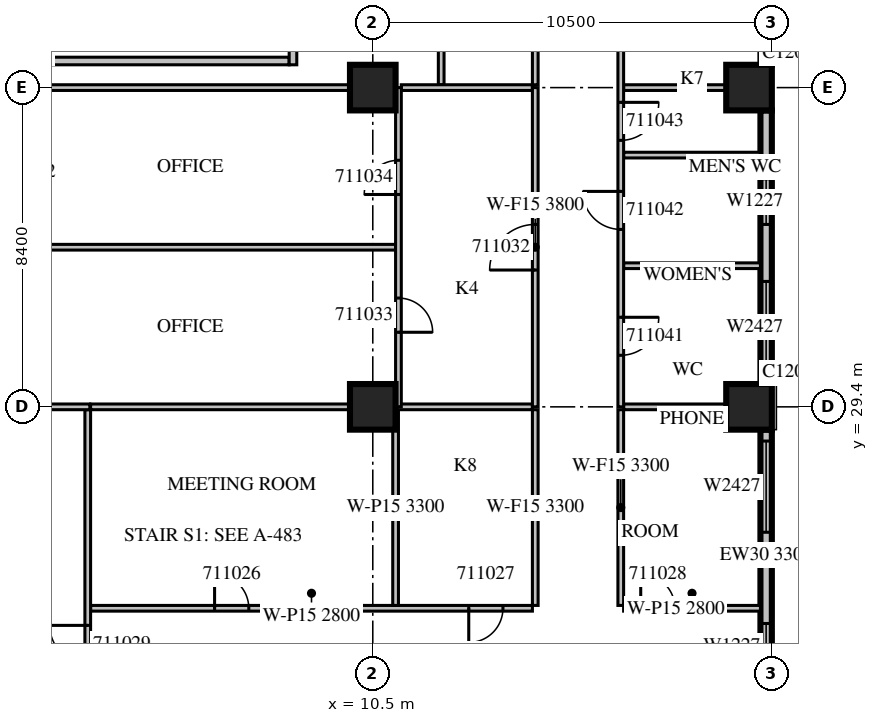
"""IFC4 building model, lengths in metres.
Left out: names, types, materials, properties, quantities, classifications, styles, units other than length and angle.
Written with IfcOpenShell. Run it as: python <this file> out.ifc"""

import sys

from ifc_helpers import new_model, si_unit, direction, frame, frame_2d, origin, origin_2d, place, context, subcontext, project, spatial, rectangle, extrude, source, transform, mapped, element, fill, save


model = new_model("IFC4")
c1 = context("Model", 3, precision=1e-05, world=origin(), true_north=direction((0.0, 1.0)))
c2 = subcontext(c1, "Body", "Model", "MODEL_VIEW")
j1 = project(units=[si_unit("LENGTHUNIT", "METRE"), si_unit("PLANEANGLEUNIT", "RADIAN")], contexts=[c1])
p1 = place(None, origin())
s1 = spatial("IfcSite", under=j1, at=p1, CompositionType="ELEMENT")
p2 = place(p1, origin())
s2 = spatial("IfcBuilding", under=s1, at=p2, CompositionType="ELEMENT")
p3 = place(p2, frame((0.0, 0.0, 57.3)))
s3 = spatial("IfcBuildingStorey", under=s2, at=p3, CompositionType="ELEMENT", Elevation=57.3)
m1 = source(origin(), c2, "Body", "SweptSolid", [
    extrude(rectangle(XDim=1.2, YDim=1.2, at=origin_2d()), origin(), (0.0, 0.0, 1.0), 4.2),
])
for number, where, z_axis, x_axis in (
    (1, (10.5, 29.4, 0.0), (0.0, 0.0, 1.0), (1.0, 0.0, 0.0)),
    (2, (20.4, 29.4, 0.0), (0.0, 0.0, 1.0), (1.0, 0.0, 0.0)),
    (3, (10.5, 37.8, 0.0), (0.0, 0.0, 1.0), (1.0, 0.0, 0.0)),
    (4, (20.4, 37.8, 0.0), (0.0, 0.0, 1.0), (1.0, 0.0, 0.0)),
):
    element("IfcColumn", number, at=place(p3, frame(where, z_axis=z_axis, x_axis=x_axis)), inside=s3, PredefinedType="COLUMN", context=c2, shape_type="MappedRepresentation", body=[
        mapped(m1, transform((0.0, 0.0, 0.0), scale=1.0)),
    ])
p4 = place(p3, frame((20.85, 22.2, 0.0), z_axis=(0.0, 0.0, 1.0), x_axis=(0.0, 1.0, 0.0)))
e5 = element("IfcWall", 5, at=p4, inside=s3, PredefinedType="STANDARD", context=c2, shape_type="SweptSolid", body=[
    extrude(rectangle(XDim=6.6, YDim=0.3, at=frame_2d((3.3, 0.0))), origin(), (0.0, 0.0, 1.0), 3.3),
])
m2 = source(origin(), c2, "Body", "SweptSolid", [
    extrude(rectangle(XDim=1.2, YDim=2.7, at=frame_2d((0.6, 1.35))), frame((0.0, 0.16, 0.0), z_axis=(0.0, -1.0, 0.0), x_axis=(1.0, 0.0, 0.0)), (0.0, 0.0, 1.0), 0.32),
])
p5 = place(p4, frame((0.3, 0.0, 0.6)))
e6 = element("IfcOpeningElement", 6, at=p5, cuts=e5, PredefinedType="OPENING", context=c2, shape_type="MappedRepresentation", body=[
    mapped(m2, transform((0.0, 0.0, 0.0), scale=1.0)),
])
m3 = source(origin(), c2, "Body", "SweptSolid", [
    extrude(rectangle(XDim=2.4, YDim=2.7, at=frame_2d((1.2, 1.35))), frame((0.0, 0.16, 0.0), z_axis=(0.0, -1.0, 0.0), x_axis=(1.0, 0.0, 0.0)), (0.0, 0.0, 1.0), 0.32),
])
p6 = place(p4, frame((3.9, 0.0, 0.6)))
e7 = element("IfcOpeningElement", 7, at=p6, cuts=e5, PredefinedType="OPENING", context=c2, shape_type="MappedRepresentation", body=[
    mapped(m3, transform((0.0, 0.0, 0.0), scale=1.0)),
])
m4 = source(origin(), c2, "Body", "SweptSolid", [
    extrude(rectangle(XDim=7.2, YDim=0.3, at=frame_2d((3.6, 0.0))), origin(), (0.0, 0.0, 1.0), 3.8),
])
p7 = place(p3, frame((20.85, 30.0, 0.0), z_axis=(0.0, 0.0, 1.0), x_axis=(0.0, 1.0, 0.0)))
e8 = element("IfcWall", 8, at=p7, inside=s3, PredefinedType="STANDARD", context=c2, shape_type="MappedRepresentation", body=[
    mapped(m4, transform((0.0, 0.0, 0.0), scale=1.0)),
])
p8 = place(p7, frame((0.3, 0.0, 0.6)))
e9 = element("IfcOpeningElement", 9, at=p8, cuts=e8, PredefinedType="OPENING", context=c2, shape_type="MappedRepresentation", body=[
    mapped(m3, transform((0.0, 0.0, 0.0), scale=1.0)),
])
p9 = place(p7, frame((4.199, 0.0, 0.6)))
e10 = element("IfcOpeningElement", 10, at=p9, cuts=e8, PredefinedType="OPENING", context=c2, shape_type="MappedRepresentation", body=[
    mapped(m2, transform((0.0, 0.0, 0.0), scale=1.0)),
])
p10 = place(p3, frame((20.85, 38.4, 0.0), z_axis=(0.0, 0.0, 1.0), x_axis=(0.0, 1.0, 0.0)))
e11 = element("IfcWall", 11, at=p10, inside=s3, PredefinedType="STANDARD", context=c2, shape_type="MappedRepresentation", body=[
    mapped(m4, transform((0.0, 0.0, 0.0), scale=1.0)),
])
p11 = place(p10, frame((0.3, 0.0, 0.6)))
e12 = element("IfcOpeningElement", 12, at=p11, cuts=e11, PredefinedType="OPENING", context=c2, shape_type="MappedRepresentation", body=[
    mapped(m3, transform((0.0, 0.0, 0.0), scale=1.0)),
])
p12 = place(p10, frame((4.5, 0.0, 0.6)))
e13 = element("IfcOpeningElement", 13, at=p12, cuts=e11, PredefinedType="OPENING", context=c2, shape_type="MappedRepresentation", body=[
    mapped(m3, transform((0.0, 0.0, 0.0), scale=1.0)),
])
m5 = source(origin(), c2, "Body", "SweptSolid", [
    extrude(rectangle(XDim=8.0, YDim=0.2, at=frame_2d((4.0, 0.0))), origin(), (0.0, 0.0, 1.0), 3.8),
])
p13 = place(p3, frame((0.3, 38.5, 0.0), z_axis=(0.0, 0.0, 1.0), x_axis=(1.0, 0.0, 0.0)))
e14 = element("IfcWall", 14, at=p13, inside=s3, PredefinedType="PARTITIONING", context=c2, shape_type="MappedRepresentation", body=[
    mapped(m5, transform((0.0, 0.0, 0.0), scale=1.0)),
])
m6 = source(origin(), c2, "Body", "SweptSolid", [
    extrude(rectangle(XDim=5.45, YDim=0.2, at=frame_2d((2.725, 0.0))), origin(), (0.0, 0.0, 1.0), 3.8),
])
p14 = place(p3, frame((8.4, 38.4, 0.0), z_axis=(0.0, 0.0, 1.0), x_axis=(0.0, 1.0, 0.0)))
e15 = element("IfcWall", 15, at=p14, inside=s3, PredefinedType="PARTITIONING", context=c2, shape_type="MappedRepresentation", body=[
    mapped(m6, transform((0.0, 0.0, 0.0), scale=1.0)),
])
m7 = source(origin(), c2, "Body", "SweptSolid", [
    extrude(rectangle(XDim=1.2, YDim=2.1, at=frame_2d((0.6, 1.05))), frame((0.0, 0.11, 0.0), z_axis=(0.0, -1.0, 0.0), x_axis=(1.0, 0.0, 0.0)), (0.0, 0.0, 1.0), 0.22),
])
p15 = place(p14, frame((0.4, 0.0, 0.0)))
e16 = element("IfcOpeningElement", 16, at=p15, cuts=e15, PredefinedType="OPENING", context=c2, shape_type="MappedRepresentation", body=[
    mapped(m7, transform((0.0, 0.0, 0.0), scale=1.0)),
])
m8 = source(origin(), c2, "Body", "SweptSolid", [
    extrude(rectangle(XDim=0.9, YDim=2.1, at=frame_2d((0.45, 1.05))), frame((0.0, 0.11, 0.0), z_axis=(0.0, -1.0, 0.0), x_axis=(1.0, 0.0, 0.0)), (0.0, 0.0, 1.0), 0.22),
])
p16 = place(p14, frame((3.25, 0.0, 0.0)))
e17 = element("IfcOpeningElement", 17, at=p16, cuts=e15, PredefinedType="OPENING", context=c2, shape_type="MappedRepresentation", body=[
    mapped(m8, transform((0.0, 0.0, 0.0), scale=1.0)),
])
p17 = place(p3, frame((3.075, 24.1, 0.0), z_axis=(0.0, 0.0, 1.0), x_axis=(1.0, 0.0, 0.0)))
e18 = element("IfcWall", 18, at=p17, inside=s3, PredefinedType="PARTITIONING", context=c2, shape_type="SweptSolid", body=[
    extrude(rectangle(XDim=11.625, YDim=0.15, at=frame_2d((5.812, 0.0))), origin(), (0.0, 0.0, 1.0), 2.8),
])
m9 = source(origin(), c2, "Body", "SweptSolid", [
    extrude(rectangle(XDim=0.9, YDim=2.1, at=frame_2d((0.45, 1.05))), frame((0.0, 0.085, 0.0), z_axis=(0.0, -1.0, 0.0), x_axis=(1.0, 0.0, 0.0)), (0.0, 0.0, 1.0), 0.17),
])
p18 = place(p17, frame((3.263, 0.0, 0.0)))
e19 = element("IfcOpeningElement", 19, at=p18, cuts=e18, PredefinedType="OPENING", context=c2, shape_type="MappedRepresentation", body=[
    mapped(m9, transform((0.0, 0.0, 0.0), scale=1.0)),
])
p19 = place(p17, frame((9.95, 0.0, 0.0)))
e20 = element("IfcOpeningElement", 20, at=p19, cuts=e18, PredefinedType="OPENING", context=c2, shape_type="MappedRepresentation", body=[
    mapped(m9, transform((0.0, 0.0, 0.0), scale=1.0)),
])
m10 = source(origin(), c2, "Body", "SweptSolid", [
    extrude(rectangle(XDim=3.6, YDim=0.15, at=frame_2d((1.8, 0.0))), origin(), (0.0, 0.0, 1.0), 2.8),
])
p20 = place(p3, frame((17.1, 24.1, 0.0), z_axis=(0.0, 0.0, 1.0), x_axis=(1.0, 0.0, 0.0)))
e21 = element("IfcWall", 21, at=p20, inside=s3, PredefinedType="PARTITIONING", context=c2, shape_type="MappedRepresentation", body=[
    mapped(m10, transform((0.0, 0.0, 0.0), scale=1.0)),
])
p21 = place(p20, frame((0.45, 0.0, 0.0)))
e22 = element("IfcOpeningElement", 22, at=p21, cuts=e21, PredefinedType="OPENING", context=c2, shape_type="MappedRepresentation", body=[
    mapped(m9, transform((0.0, 0.0, 0.0), scale=1.0)),
])
m11 = source(origin(), c2, "Body", "SweptSolid", [
    extrude(rectangle(XDim=5.15, YDim=0.15, at=frame_2d((2.575, 0.0))), origin(), (0.0, 0.0, 1.0), 3.3),
])
for number, where, z_axis, x_axis in (
    (23, (11.1, 24.175, 0.0), (0.0, 0.0, 1.0), (0.0, 1.0, 0.0)),
    (24, (14.775, 24.175, 0.0), (0.0, 0.0, 1.0), (0.0, 1.0, 0.0)),
    (25, (17.025, 29.325, 0.0), (0.0, 0.0, 1.0), (0.0, -1.0, 0.0)),
):
    element("IfcWall", number, at=place(p3, frame(where, z_axis=z_axis, x_axis=x_axis)), inside=s3, PredefinedType="PARTITIONING", context=c2, shape_type="MappedRepresentation", body=[
        mapped(m11, transform((0.0, 0.0, 0.0), scale=1.0)),
    ])
m12 = source(origin(), c2, "Body", "SweptSolid", [
    extrude(rectangle(XDim=6.826, YDim=0.15, at=frame_2d((3.413, 0.0))), origin(), (0.0, 0.0, 1.0), 3.8),
])
p22 = place(p3, frame((9.901, 29.4, 0.0), z_axis=(0.0, 0.0, 1.0), x_axis=(-1.0, 0.0, 0.0)))
e26 = element("IfcWall", 26, at=p22, inside=s3, PredefinedType="PARTITIONING", context=c2, shape_type="MappedRepresentation", body=[
    mapped(m12, transform((0.0, 0.0, 0.0), scale=1.0)),
])
m13 = source(origin(), c2, "Body", "SweptSolid", [
    extrude(rectangle(XDim=3.601, YDim=0.15, at=frame_2d((1.8, 0.0))), origin(), (0.0, 0.0, 1.0), 3.8),
])
p23 = place(p3, frame((14.7, 29.4, 0.0), z_axis=(0.0, 0.0, 1.0), x_axis=(-1.0, 0.0, 0.0)))
e27 = element("IfcWall", 27, at=p23, inside=s3, PredefinedType="PARTITIONING", context=c2, shape_type="MappedRepresentation", body=[
    mapped(m13, transform((0.0, 0.0, 0.0), scale=1.0)),
])
m14 = source(origin(), c2, "Body", "SweptSolid", [
    extrude(rectangle(XDim=2.701, YDim=0.15, at=frame_2d((1.351, 0.0))), origin(), (0.0, 0.0, 1.0), 3.8),
])
p24 = place(p3, frame((19.801, 29.4, 0.0), z_axis=(0.0, 0.0, 1.0), x_axis=(-1.0, 0.0, 0.0)))
e28 = element("IfcWall", 28, at=p24, inside=s3, PredefinedType="PARTITIONING", context=c2, shape_type="MappedRepresentation", body=[
    mapped(m14, transform((0.0, 0.0, 0.0), scale=1.0)),
])
m15 = source(origin(), c2, "Body", "SweptSolid", [
    extrude(rectangle(XDim=7.125, YDim=0.15, at=frame_2d((3.562, 0.0))), origin(), (0.0, 0.0, 1.0), 3.8),
])
p25 = place(p3, frame((3.0, 29.325, 0.0), z_axis=(0.0, 0.0, 1.0), x_axis=(0.0, -1.0, 0.0)))
e29 = element("IfcWall", 29, at=p25, inside=s3, PredefinedType="PARTITIONING", context=c2, shape_type="MappedRepresentation", body=[
    mapped(m15, transform((0.0, 0.0, 0.0), scale=1.0)),
])
m16 = source(origin(), c2, "Body", "SweptSolid", [
    extrude(rectangle(XDim=1.0, YDim=2.1, at=frame_2d((0.5, 1.05))), frame((0.0, 0.085, 0.0), z_axis=(0.0, -1.0, 0.0), x_axis=(1.0, 0.0, 0.0)), (0.0, 0.0, 1.0), 0.17),
])
p26 = place(p25, frame((5.675, 0.0, 0.0)))
e30 = element("IfcOpeningElement", 30, at=p26, cuts=e29, PredefinedType="OPENING", context=c2, shape_type="MappedRepresentation", body=[
    mapped(m16, transform((0.0, 0.0, 0.0), scale=1.0)),
])
m17 = source(origin(), c2, "Body", "SweptSolid", [
    extrude(rectangle(XDim=6.45, YDim=0.15, at=frame_2d((3.225, 0.0))), origin(), (0.0, 0.0, 1.0), 3.8),
])
p27 = place(p3, frame((12.3, 44.325, 0.0), z_axis=(0.0, 0.0, 1.0), x_axis=(0.0, -1.0, 0.0)))
e31 = element("IfcWall", 31, at=p27, inside=s3, PredefinedType="PARTITIONING", context=c2, shape_type="MappedRepresentation", body=[
    mapped(m17, transform((0.0, 0.0, 0.0), scale=1.0)),
])
p28 = place(p3, frame((14.775, 37.875, 0.0), z_axis=(0.0, 0.0, 1.0), x_axis=(0.0, 1.0, 0.0)))
e32 = element("IfcWall", 32, at=p28, inside=s3, PredefinedType="PARTITIONING", context=c2, shape_type="MappedRepresentation", body=[
    mapped(m17, transform((0.0, 0.0, 0.0), scale=1.0)),
])
p29 = place(p28, frame((2.737, 0.0, 0.0)))
e33 = element("IfcOpeningElement", 33, at=p29, cuts=e32, PredefinedType="OPENING", context=c2, shape_type="MappedRepresentation", body=[
    mapped(m9, transform((0.0, 0.0, 0.0), scale=1.0)),
])
m18 = source(origin(), c2, "Body", "SweptSolid", [
    extrude(rectangle(XDim=10.8, YDim=0.15, at=frame_2d((5.4, 0.0))), origin(), (0.0, 0.0, 1.0), 3.8),
])
p30 = place(p3, frame((11.1, 33.6, 0.0), z_axis=(0.0, 0.0, 1.0), x_axis=(-1.0, 0.0, 0.0)))
e34 = element("IfcWall", 34, at=p30, inside=s3, PredefinedType="PARTITIONING", context=c2, shape_type="MappedRepresentation", body=[
    mapped(m18, transform((0.0, 0.0, 0.0), scale=1.0)),
])
m19 = source(origin(), c2, "Body", "SweptSolid", [
    extrude(rectangle(XDim=1.856, YDim=0.15, at=frame_2d((0.928, 0.0))), origin(), (0.0, 0.0, 1.0), 3.8),
])
p31 = place(p3, frame((3.055, 29.4, 0.0), z_axis=(0.0, 0.0, 1.0), x_axis=(-1.0, 0.0, 0.0)))
e35 = element("IfcWall", 35, at=p31, inside=s3, PredefinedType="PARTITIONING", context=c2, shape_type="MappedRepresentation", body=[
    mapped(m19, transform((0.0, 0.0, 0.0), scale=1.0)),
])
m20 = source(origin(), c2, "Body", "SweptSolid", [
    extrude(rectangle(XDim=8.702, YDim=0.15, at=frame_2d((4.351, 0.0))), origin(), (0.0, 0.0, 1.0), 3.8),
])
p32 = place(p3, frame((9.901, 37.8, 0.0), z_axis=(0.0, 0.0, 1.0), x_axis=(-1.0, 0.0, 0.0)))
e36 = element("IfcWall", 36, at=p32, inside=s3, PredefinedType="PARTITIONING", context=c2, shape_type="MappedRepresentation", body=[
    mapped(m20, transform((0.0, 0.0, 0.0), scale=1.0)),
])
m21 = source(origin(), c2, "Body", "SweptSolid", [
    extrude(rectangle(XDim=3.45, YDim=0.15, at=frame_2d((1.725, 0.0))), origin(), (0.0, 0.0, 1.0), 3.8),
])
p33 = place(p3, frame((14.7, 37.8, 0.0), z_axis=(0.0, 0.0, 1.0), x_axis=(-1.0, 0.0, 0.0)))
e37 = element("IfcWall", 37, at=p33, inside=s3, PredefinedType="PARTITIONING", context=c2, shape_type="MappedRepresentation", body=[
    mapped(m21, transform((0.0, 0.0, 0.0), scale=1.0)),
])
m22 = source(origin(), c2, "Body", "SweptSolid", [
    extrude(rectangle(XDim=8.4, YDim=0.15, at=frame_2d((4.2, 0.0))), origin(), (0.0, 0.0, 1.0), 3.8),
])
p34 = place(p3, frame((11.175, 29.4, 0.0), z_axis=(0.0, 0.0, 1.0), x_axis=(0.0, 1.0, 0.0)))
e38 = element("IfcWall", 38, at=p34, inside=s3, PredefinedType="PARTITIONING", context=c2, shape_type="MappedRepresentation", body=[
    mapped(m22, transform((0.0, 0.0, 0.0), scale=1.0)),
])
p35 = place(p34, frame((1.962, 0.0, 0.0)))
e39 = element("IfcOpeningElement", 39, at=p35, cuts=e38, PredefinedType="OPENING", context=c2, shape_type="MappedRepresentation", body=[
    mapped(m9, transform((0.0, 0.0, 0.0), scale=1.0)),
])
p36 = place(p34, frame((5.588, 0.0, 0.0)))
e40 = element("IfcOpeningElement", 40, at=p36, cuts=e38, PredefinedType="OPENING", context=c2, shape_type="MappedRepresentation", body=[
    mapped(m9, transform((0.0, 0.0, 0.0), scale=1.0)),
])
m23 = source(origin(), c2, "Body", "SweptSolid", [
    extrude(rectangle(XDim=3.6, YDim=0.15, at=frame_2d((1.8, 0.0))), origin(), (0.0, 0.0, 1.0), 3.8),
])
for number, where, z_axis, x_axis in (
    (41, (17.1, 33.113, 0.0), (0.0, 0.0, 1.0), (1.0, 0.0, 0.0)),
    (42, (17.1, 36.024, 0.0), (0.0, 0.0, 1.0), (1.0, 0.0, 0.0)),
):
    element("IfcWall", number, at=place(p3, frame(where, z_axis=z_axis, x_axis=x_axis)), inside=s3, PredefinedType="PARTITIONING", context=c2, shape_type="MappedRepresentation", body=[
        mapped(m23, transform((0.0, 0.0, 0.0), scale=1.0)),
    ])
p37 = place(p3, frame((19.801, 37.8, 0.0), z_axis=(0.0, 0.0, 1.0), x_axis=(-1.0, 0.0, 0.0)))
e43 = element("IfcWall", 43, at=p37, inside=s3, PredefinedType="PARTITIONING", context=c2, shape_type="MappedRepresentation", body=[
    mapped(m14, transform((0.0, 0.0, 0.0), scale=1.0)),
])
p38 = place(p3, frame((14.775, 29.4, 0.0), z_axis=(0.0, 0.0, 1.0), x_axis=(0.0, 1.0, 0.0)))
e44 = element("IfcWall", 44, at=p38, inside=s3, PredefinedType="PARTITIONING", context=c2, shape_type="MappedRepresentation", body=[
    mapped(m22, transform((0.0, 0.0, 0.0), scale=1.0)),
])
m24 = source(origin(), c2, "Body", "SweptSolid", [
    extrude(rectangle(XDim=1.2, YDim=2.1, at=frame_2d((0.6, 1.05))), frame((0.0, 0.085, 0.0), z_axis=(0.0, -1.0, 0.0), x_axis=(1.0, 0.0, 0.0)), (0.0, 0.0, 1.0), 0.17),
])
p39 = place(p38, frame((3.6, 0.0, 0.0)))
e45 = element("IfcOpeningElement", 45, at=p39, cuts=e44, PredefinedType="OPENING", context=c2, shape_type="MappedRepresentation", body=[
    mapped(m24, transform((0.0, 0.0, 0.0), scale=1.0)),
])
m25 = source(origin(), c2, "Body", "SweptSolid", [
    extrude(rectangle(XDim=31.62, YDim=0.15, at=frame_2d((15.81, 0.0))), origin(), (0.0, 0.0, 1.0), 3.8),
])
p40 = place(p3, frame((17.025, 61.02, 0.0), z_axis=(0.0, 0.0, 1.0), x_axis=(0.0, -1.0, 0.0)))
e46 = element("IfcWall", 46, at=p40, inside=s3, PredefinedType="PARTITIONING", context=c2, shape_type="MappedRepresentation", body=[
    mapped(m25, transform((0.0, 0.0, 0.0), scale=1.0)),
])
p41 = place(p40, frame((29.263, 0.0, 0.0)))
e47 = element("IfcOpeningElement", 47, at=p41, cuts=e46, PredefinedType="OPENING", context=c2, shape_type="MappedRepresentation", body=[
    mapped(m16, transform((0.0, 0.0, 0.0), scale=1.0)),
])
p42 = place(p40, frame((25.951, 0.0, 0.0)))
e48 = element("IfcOpeningElement", 48, at=p42, cuts=e46, PredefinedType="OPENING", context=c2, shape_type="MappedRepresentation", body=[
    mapped(m16, transform((0.0, 0.0, 0.0), scale=1.0)),
])
p43 = place(p40, frame((23.608, 0.0, 0.0)))
e49 = element("IfcOpeningElement", 49, at=p43, cuts=e46, PredefinedType="OPENING", context=c2, shape_type="MappedRepresentation", body=[
    mapped(m16, transform((0.0, 0.0, 0.0), scale=1.0)),
])
p44 = place(p40, frame((18.52, 0.0, 0.0)))
e50 = element("IfcOpeningElement", 50, at=p44, cuts=e46, PredefinedType="OPENING", context=c2, shape_type="MappedRepresentation", body=[
    mapped(m16, transform((0.0, 0.0, 0.0), scale=1.0)),
])
p45 = place(p40, frame((10.496, 0.0, 0.0)))
e51 = element("IfcOpeningElement", 51, at=p45, cuts=e46, PredefinedType="OPENING", context=c2, shape_type="MappedRepresentation", body=[
    mapped(m24, transform((0.0, 0.0, 0.0), scale=1.0)),
])
p46 = place(p40, frame((3.049, 0.0, 0.0)))
e52 = element("IfcOpeningElement", 52, at=p46, cuts=e46, PredefinedType="OPENING", context=c2, shape_type="MappedRepresentation", body=[
    mapped(m24, transform((0.0, 0.0, 0.0), scale=1.0)),
])
m26 = source(origin(), c2, "Body", "SweptSolid", [
    extrude(rectangle(XDim=1.2, YDim=2.7, at=frame_2d((0.6, 1.35))), frame((0.0, 0.03, 0.0), z_axis=(0.0, -1.0, 0.0), x_axis=(1.0, 0.0, 0.0)), (0.0, 0.0, 1.0), 0.06),
])
p47 = place(p5, origin())
e53 = element("IfcWindow", 53, at=p47, inside=s3, PartitioningType="SINGLE_PANEL", PredefinedType="WINDOW", context=c2, shape_type="MappedRepresentation", body=[
    mapped(m26, transform((0.0, 0.0, 0.0), scale=1.0)),
])
fill(e6, e53)
m27 = source(origin(), c2, "Body", "SweptSolid", [
    extrude(rectangle(XDim=2.4, YDim=2.7, at=frame_2d((1.2, 1.35))), frame((0.0, 0.03, 0.0), z_axis=(0.0, -1.0, 0.0), x_axis=(1.0, 0.0, 0.0)), (0.0, 0.0, 1.0), 0.06),
])
p48 = place(p6, origin())
e54 = element("IfcWindow", 54, at=p48, inside=s3, PartitioningType="SINGLE_PANEL", PredefinedType="WINDOW", context=c2, shape_type="MappedRepresentation", body=[
    mapped(m27, transform((0.0, 0.0, 0.0), scale=1.0)),
])
fill(e7, e54)
p49 = place(p8, origin())
e55 = element("IfcWindow", 55, at=p49, inside=s3, PartitioningType="SINGLE_PANEL", PredefinedType="WINDOW", context=c2, shape_type="MappedRepresentation", body=[
    mapped(m27, transform((0.0, 0.0, 0.0), scale=1.0)),
])
fill(e9, e55)
p50 = place(p9, origin())
e56 = element("IfcWindow", 56, at=p50, inside=s3, PartitioningType="SINGLE_PANEL", PredefinedType="WINDOW", context=c2, shape_type="MappedRepresentation", body=[
    mapped(m26, transform((0.0, 0.0, 0.0), scale=1.0)),
])
fill(e10, e56)
p51 = place(p11, origin())
e57 = element("IfcWindow", 57, at=p51, inside=s3, PartitioningType="SINGLE_PANEL", PredefinedType="WINDOW", context=c2, shape_type="MappedRepresentation", body=[
    mapped(m27, transform((0.0, 0.0, 0.0), scale=1.0)),
])
fill(e12, e57)
m28 = source(origin(), c2, "Body", "SweptSolid", [
    extrude(rectangle(XDim=0.9, YDim=2.1, at=frame_2d((0.45, 1.05))), frame((0.0, 0.025, 0.0), z_axis=(0.0, -1.0, 0.0), x_axis=(1.0, 0.0, 0.0)), (0.0, 0.0, 1.0), 0.05),
])
p52 = place(p18, origin())
e58 = element("IfcDoor", 58, at=p52, inside=s3, OperationType="SINGLE_SWING_LEFT", PredefinedType="DOOR", context=c2, shape_type="MappedRepresentation", body=[
    mapped(m28, transform((0.0, 0.0, 0.0), scale=1.0)),
])
fill(e19, e58)
p53 = place(p19, origin())
e59 = element("IfcDoor", 59, at=p53, inside=s3, OperationType="SINGLE_SWING_RIGHT", PredefinedType="DOOR", context=c2, shape_type="MappedRepresentation", body=[
    mapped(m28, transform((0.0, 0.0, 0.0), scale=1.0)),
])
fill(e20, e59)
p54 = place(p21, origin())
e60 = element("IfcDoor", 60, at=p54, inside=s3, OperationType="SINGLE_SWING_LEFT", PredefinedType="DOOR", context=c2, shape_type="MappedRepresentation", body=[
    mapped(m28, transform((0.0, 0.0, 0.0), scale=1.0)),
])
fill(e22, e60)
m29 = source(origin(), c2, "Body", "SweptSolid", [
    extrude(rectangle(XDim=1.0, YDim=2.1, at=frame_2d((0.5, 1.05))), frame((0.0, 0.025, 0.0), z_axis=(0.0, -1.0, 0.0), x_axis=(1.0, 0.0, 0.0)), (0.0, 0.0, 1.0), 0.05),
])
p55 = place(p26, origin())
e61 = element("IfcDoor", 61, at=p55, inside=s3, OperationType="SINGLE_SWING_RIGHT", PredefinedType="DOOR", context=c2, shape_type="MappedRepresentation", body=[
    mapped(m29, transform((0.0, 0.0, 0.0), scale=1.0)),
])
fill(e30, e61)
m30 = source(origin(), c2, "Body", "SweptSolid", [
    extrude(rectangle(XDim=1.2, YDim=2.1, at=frame_2d((0.6, 1.05))), frame((0.0, 0.025, 0.0), z_axis=(0.0, -1.0, 0.0), x_axis=(1.0, 0.0, 0.0)), (0.0, 0.0, 1.0), 0.05),
])
p56 = place(p39, origin())
e62 = element("IfcDoor", 62, at=p56, inside=s3, OperationType="SINGLE_SWING_LEFT", PredefinedType="DOOR", context=c2, shape_type="MappedRepresentation", body=[
    mapped(m30, transform((0.0, 0.0, 0.0), scale=1.0)),
])
fill(e45, e62)
p57 = place(p35, origin())
e63 = element("IfcDoor", 63, at=p57, inside=s3, OperationType="SINGLE_SWING_RIGHT", PredefinedType="DOOR", context=c2, shape_type="MappedRepresentation", body=[
    mapped(m28, transform((0.0, 0.0, 0.0), scale=1.0)),
])
fill(e39, e63)
p58 = place(p36, origin())
e64 = element("IfcDoor", 64, at=p58, inside=s3, OperationType="SINGLE_SWING_LEFT", PredefinedType="DOOR", context=c2, shape_type="MappedRepresentation", body=[
    mapped(m28, transform((0.0, 0.0, 0.0), scale=1.0)),
])
fill(e40, e64)
p59 = place(p41, origin())
e65 = element("IfcDoor", 65, at=p59, inside=s3, OperationType="SINGLE_SWING_LEFT", PredefinedType="DOOR", context=c2, shape_type="MappedRepresentation", body=[
    mapped(m29, transform((0.0, 0.0, 0.0), scale=1.0)),
])
fill(e47, e65)
p60 = place(p42, origin())
e66 = element("IfcDoor", 66, at=p60, inside=s3, OperationType="SINGLE_SWING_RIGHT", PredefinedType="DOOR", context=c2, shape_type="MappedRepresentation", body=[
    mapped(m29, transform((0.0, 0.0, 0.0), scale=1.0)),
])
fill(e48, e66)
p61 = place(p43, origin())
e67 = element("IfcDoor", 67, at=p61, inside=s3, OperationType="SINGLE_SWING_LEFT", PredefinedType="DOOR", context=c2, shape_type="MappedRepresentation", body=[
    mapped(m29, transform((0.0, 0.0, 0.0), scale=1.0)),
])
fill(e49, e67)
save(model, sys.argv[1])
